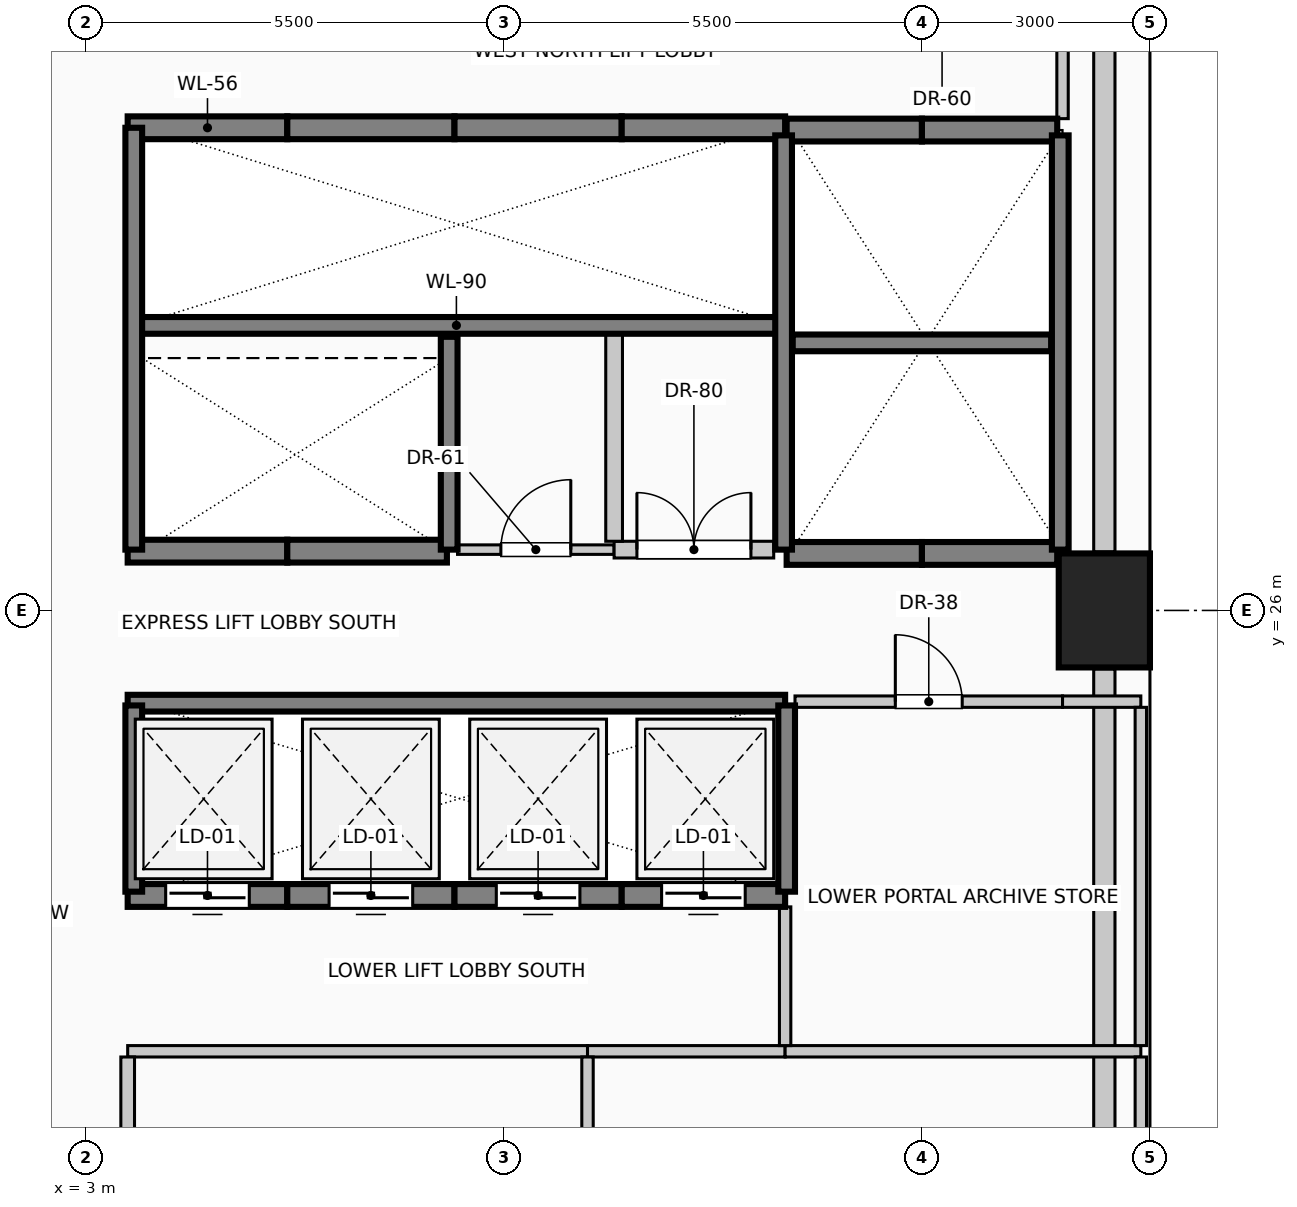
"""IFC4 building model, lengths in metres.
Left out: names, types, materials, properties, quantities, classifications, styles, units other than length and angle.
Written with IfcOpenShell. Run it as: python <this file> out.ifc"""

import sys

from ifc_helpers import new_model, si_unit, direction, frame, frame_2d, origin, origin_2d, place, context, subcontext, project, spatial, rectangle, extrude, element, fill, save


model = new_model("IFC4")
c1 = context("Model", 3, precision=1e-05, world=origin(), true_north=direction((0.0, 1.0)))
c2 = subcontext(c1, "Body", "Model", "MODEL_VIEW")
j1 = project(units=[si_unit("LENGTHUNIT", "METRE"), si_unit("PLANEANGLEUNIT", "RADIAN")], contexts=[c1])
p1 = place(None, origin())
s1 = spatial("IfcSite", under=j1, at=p1, CompositionType="ELEMENT")
p2 = place(p1, origin())
s2 = spatial("IfcBuilding", under=s1, at=p2, CompositionType="ELEMENT")
p3 = place(p2, frame((0.0, 0.0, 34.6)))
s3 = spatial("IfcBuildingStorey", under=s2, at=p3, CompositionType="ELEMENT", Elevation=34.6)
p4 = place(p3, frame((16.4, 26.0, 0.0), z_axis=(0.0, 0.0, 1.0), x_axis=(1.0, 0.0, 0.0)))
e1 = element("IfcColumn", 1, at=p4, inside=s3, PredefinedType="COLUMN", context=c2, shape_type="SweptSolid", body=[
    extrude(rectangle(XDim=1.2, YDim=1.5, at=origin_2d()), origin(), (0.0, 0.0, 1.0), 4.0),
])
p5 = place(p3, frame((16.4, 25.23, 0.0), z_axis=(0.0, 0.0, 1.0), x_axis=(0.0, -1.0, 0.0)))
e2 = element("IfcWall", 2, at=p5, inside=s3, PredefinedType="SOLIDWALL", context=c2, shape_type="SweptSolid", body=[
    extrude(rectangle(XDim=6.46, YDim=0.28, at=frame_2d((3.23, 0.0))), origin(), (0.0, 0.0, 1.0), 3.0),
])
p6 = place(p3, frame((16.4, 33.48, 0.0), z_axis=(0.0, 0.0, 1.0), x_axis=(0.0, -1.0, 0.0)))
e3 = element("IfcWall", 3, at=p6, inside=s3, PredefinedType="SOLIDWALL", context=c2, shape_type="SweptSolid", body=[
    extrude(rectangle(XDim=6.71, YDim=0.28, at=frame_2d((3.355, 0.0))), origin(), (0.0, 0.0, 1.0), 3.0),
])
p7 = place(p3, frame((5.65, 22.25, 0.0), z_axis=(0.0, 0.0, 1.0), x_axis=(-1.0, 0.0, 0.0)))
e4 = element("IfcWall", 4, at=p7, inside=s3, PredefinedType="SOLIDWALL", context=c2, shape_type="SweptSolid", body=[
    extrude(rectangle(XDim=2.1, YDim=0.3, at=frame_2d((1.05, 0.0))), origin(), (0.0, 0.0, 1.0), 4.0),
])
p8 = place(p7, frame((0.5, 0.0, 0.0)))
e5 = element("IfcOpeningElement", 5, at=p8, cuts=e4, PredefinedType="OPENING", context=c2, shape_type="SweptSolid", body=[
    extrude(rectangle(XDim=1.1, YDim=2.2, at=frame_2d((0.55, 1.1))), frame((0.0, 0.16, 0.0), z_axis=(0.0, -1.0, 0.0), x_axis=(1.0, 0.0, 0.0)), (0.0, 0.0, 1.0), 0.32),
])
p9 = place(p3, frame((7.85, 22.25, 0.0), z_axis=(0.0, 0.0, 1.0), x_axis=(-1.0, 0.0, 0.0)))
e6 = element("IfcWall", 6, at=p9, inside=s3, PredefinedType="SOLIDWALL", context=c2, shape_type="SweptSolid", body=[
    extrude(rectangle(XDim=2.2, YDim=0.3, at=frame_2d((1.1, 0.0))), origin(), (0.0, 0.0, 1.0), 4.0),
])
p10 = place(p9, frame((0.55, 0.0, 0.0)))
e7 = element("IfcOpeningElement", 7, at=p10, cuts=e6, PredefinedType="OPENING", context=c2, shape_type="SweptSolid", body=[
    extrude(rectangle(XDim=1.1, YDim=2.2, at=frame_2d((0.55, 1.1))), frame((0.0, 0.16, 0.0), z_axis=(0.0, -1.0, 0.0), x_axis=(1.0, 0.0, 0.0)), (0.0, 0.0, 1.0), 0.32),
])
p11 = place(p3, frame((10.05, 22.25, 0.0), z_axis=(0.0, 0.0, 1.0), x_axis=(-1.0, 0.0, 0.0)))
e8 = element("IfcWall", 8, at=p11, inside=s3, PredefinedType="SOLIDWALL", context=c2, shape_type="SweptSolid", body=[
    extrude(rectangle(XDim=2.2, YDim=0.3, at=frame_2d((1.1, 0.0))), origin(), (0.0, 0.0, 1.0), 4.0),
])
p12 = place(p11, frame((0.55, 0.0, 0.0)))
e9 = element("IfcOpeningElement", 9, at=p12, cuts=e8, PredefinedType="OPENING", context=c2, shape_type="SweptSolid", body=[
    extrude(rectangle(XDim=1.1, YDim=2.2, at=frame_2d((0.55, 1.1))), frame((0.0, 0.16, 0.0), z_axis=(0.0, -1.0, 0.0), x_axis=(1.0, 0.0, 0.0)), (0.0, 0.0, 1.0), 0.32),
])
p13 = place(p3, frame((12.2, 22.25, 0.0), z_axis=(0.0, 0.0, 1.0), x_axis=(-1.0, 0.0, 0.0)))
e10 = element("IfcWall", 10, at=p13, inside=s3, PredefinedType="SOLIDWALL", context=c2, shape_type="SweptSolid", body=[
    extrude(rectangle(XDim=2.15, YDim=0.3, at=frame_2d((1.075, 0.0))), origin(), (0.0, 0.0, 1.0), 4.0),
])
p14 = place(p13, frame((0.525, 0.0, 0.0)))
e11 = element("IfcOpeningElement", 11, at=p14, cuts=e10, PredefinedType="OPENING", context=c2, shape_type="SweptSolid", body=[
    extrude(rectangle(XDim=1.1, YDim=2.2, at=frame_2d((0.55, 1.1))), frame((0.0, 0.16, 0.0), z_axis=(0.0, -1.0, 0.0), x_axis=(1.0, 0.0, 0.0)), (0.0, 0.0, 1.0), 0.32),
])
for number, where, z_axis, x_axis in (
    (12, (14.0, 26.75, 0.0), (0.0, 0.0, 1.0), (-1.0, 0.0, 0.0)),
    (13, (15.78, 26.75, 0.0), (0.0, 0.0, 1.0), (-1.0, 0.0, 0.0)),
    (14, (12.22, 32.32, 0.0), (0.0, 0.0, 1.0), (1.0, 0.0, 0.0)),
    (15, (14.0, 32.32, 0.0), (0.0, 0.0, 1.0), (1.0, 0.0, 0.0)),
):
    element("IfcWall", number, at=place(p3, frame(where, z_axis=z_axis, x_axis=x_axis)), inside=s3, PredefinedType="SOLIDWALL", context=c2, shape_type="SweptSolid", body=[
        extrude(rectangle(XDim=1.78, YDim=0.3, at=frame_2d((0.89, 0.0))), origin(), (0.0, 0.0, 1.0), 4.0),
    ])
p15 = place(p3, frame((3.55, 32.35, 0.0), z_axis=(0.0, 0.0, 1.0), x_axis=(1.0, 0.0, 0.0)))
e16 = element("IfcWall", 16, at=p15, inside=s3, PredefinedType="SOLIDWALL", context=c2, shape_type="SweptSolid", body=[
    extrude(rectangle(XDim=2.1, YDim=0.3, at=frame_2d((1.05, 0.0))), origin(), (0.0, 0.0, 1.0), 4.0),
])
p16 = place(p3, frame((5.65, 32.35, 0.0), z_axis=(0.0, 0.0, 1.0), x_axis=(1.0, 0.0, 0.0)))
e17 = element("IfcWall", 17, at=p16, inside=s3, PredefinedType="SOLIDWALL", context=c2, shape_type="SweptSolid", body=[
    extrude(rectangle(XDim=2.2, YDim=0.3, at=frame_2d((1.1, 0.0))), origin(), (0.0, 0.0, 1.0), 4.0),
])
p17 = place(p3, frame((7.85, 32.35, 0.0), z_axis=(0.0, 0.0, 1.0), x_axis=(1.0, 0.0, 0.0)))
e18 = element("IfcWall", 18, at=p17, inside=s3, PredefinedType="SOLIDWALL", context=c2, shape_type="SweptSolid", body=[
    extrude(rectangle(XDim=2.2, YDim=0.3, at=frame_2d((1.1, 0.0))), origin(), (0.0, 0.0, 1.0), 4.0),
])
p18 = place(p3, frame((10.05, 32.35, 0.0), z_axis=(0.0, 0.0, 1.0), x_axis=(1.0, 0.0, 0.0)))
e19 = element("IfcWall", 19, at=p18, inside=s3, PredefinedType="SOLIDWALL", context=c2, shape_type="SweptSolid", body=[
    extrude(rectangle(XDim=2.15, YDim=0.3, at=frame_2d((1.075, 0.0))), origin(), (0.0, 0.0, 1.0), 4.0),
])
p19 = place(p3, frame((5.65, 26.78, 0.0), z_axis=(0.0, 0.0, 1.0), x_axis=(-1.0, 0.0, 0.0)))
e20 = element("IfcWall", 20, at=p19, inside=s3, PredefinedType="SOLIDWALL", context=c2, shape_type="SweptSolid", body=[
    extrude(rectangle(XDim=2.1, YDim=0.3, at=frame_2d((1.05, 0.0))), origin(), (0.0, 0.0, 1.0), 4.0),
])
p20 = place(p3, frame((7.75, 26.78, 0.0), z_axis=(0.0, 0.0, 1.0), x_axis=(-1.0, 0.0, 0.0)))
e21 = element("IfcWall", 21, at=p20, inside=s3, PredefinedType="SOLIDWALL", context=c2, shape_type="SweptSolid", body=[
    extrude(rectangle(XDim=2.1, YDim=0.3, at=frame_2d((1.05, 0.0))), origin(), (0.0, 0.0, 1.0), 4.0),
])
p21 = place(p3, frame((3.55, 29.75, 0.0), z_axis=(0.0, 0.0, 1.0), x_axis=(1.0, 0.0, 0.0)))
e22 = element("IfcWall", 22, at=p21, inside=s3, PredefinedType="SOLIDWALL", context=c2, shape_type="SweptSolid", body=[
    extrude(rectangle(XDim=8.65, YDim=0.22, at=frame_2d((4.325, 0.0))), origin(), (0.0, 0.0, 1.0), 4.0),
])
p22 = place(p3, frame((3.63, 26.8, 0.0), z_axis=(0.0, 0.0, 1.0), x_axis=(0.0, 1.0, 0.0)))
e23 = element("IfcWall", 23, at=p22, inside=s3, PredefinedType="SOLIDWALL", context=c2, shape_type="SweptSolid", body=[
    extrude(rectangle(XDim=5.55, YDim=0.22, at=frame_2d((2.775, 0.0))), origin(), (0.0, 0.0, 1.0), 4.0),
])
p23 = place(p3, frame((7.78, 26.8, 0.0), z_axis=(0.0, 0.0, 1.0), x_axis=(0.0, 1.0, 0.0)))
e24 = element("IfcWall", 24, at=p23, inside=s3, PredefinedType="SOLIDWALL", context=c2, shape_type="SweptSolid", body=[
    extrude(rectangle(XDim=2.8, YDim=0.22, at=frame_2d((1.4, 0.0))), origin(), (0.0, 0.0, 1.0), 4.0),
])
for number, where, z_axis, x_axis in (
    (25, (12.18, 26.8, 0.0), (0.0, 0.0, 1.0), (0.0, 1.0, 0.0)),
    (26, (15.82, 26.8, 0.0), (0.0, 0.0, 1.0), (0.0, 1.0, 0.0)),
):
    element("IfcWall", number, at=place(p3, frame(where, z_axis=z_axis, x_axis=x_axis)), inside=s3, PredefinedType="SOLIDWALL", context=c2, shape_type="SweptSolid", body=[
        extrude(rectangle(XDim=5.45, YDim=0.22, at=frame_2d((2.725, 0.0))), origin(), (0.0, 0.0, 1.0), 4.0),
    ])
p24 = place(p3, frame((12.3, 29.52, 0.0), z_axis=(0.0, 0.0, 1.0), x_axis=(1.0, 0.0, 0.0)))
e27 = element("IfcWall", 27, at=p24, inside=s3, PredefinedType="SOLIDWALL", context=c2, shape_type="SweptSolid", body=[
    extrude(rectangle(XDim=3.4, YDim=0.22, at=frame_2d((1.7, 0.0))), origin(), (0.0, 0.0, 1.0), 4.0),
])
p25 = place(p3, frame((3.55, 24.78, 0.0), z_axis=(0.0, 0.0, 1.0), x_axis=(1.0, 0.0, 0.0)))
e28 = element("IfcWall", 28, at=p25, inside=s3, PredefinedType="SOLIDWALL", context=c2, shape_type="SweptSolid", body=[
    extrude(rectangle(XDim=8.65, YDim=0.22, at=frame_2d((4.325, 0.0))), origin(), (0.0, 0.0, 1.0), 4.0),
])
for number, where, z_axis, x_axis in (
    (29, (3.63, 22.3, 0.0), (0.0, 0.0, 1.0), (0.0, 1.0, 0.0)),
    (30, (12.22, 22.3, 0.0), (0.0, 0.0, 1.0), (0.0, 1.0, 0.0)),
):
    element("IfcWall", number, at=place(p3, frame(where, z_axis=z_axis, x_axis=x_axis)), inside=s3, PredefinedType="SOLIDWALL", context=c2, shape_type="SweptSolid", body=[
        extrude(rectangle(XDim=2.45, YDim=0.22, at=frame_2d((1.225, 0.0))), origin(), (0.0, 0.0, 1.0), 4.0),
    ])
p26 = place(p3, frame((3.55, 20.2, 0.0), z_axis=(0.0, 0.0, 1.0), x_axis=(1.0, 0.0, 0.0)))
e31 = element("IfcWall", 31, at=p26, inside=s3, PredefinedType="PARTITIONING", context=c2, shape_type="SweptSolid", body=[
    extrude(rectangle(XDim=6.05, YDim=0.15, at=frame_2d((3.025, 0.0))), origin(), (0.0, 0.0, 1.0), 3.7),
])
p27 = place(p3, frame((9.6, 20.2, 0.0), z_axis=(0.0, 0.0, 1.0), x_axis=(1.0, 0.0, 0.0)))
e32 = element("IfcWall", 32, at=p27, inside=s3, PredefinedType="PARTITIONING", context=c2, shape_type="SweptSolid", body=[
    extrude(rectangle(XDim=2.6, YDim=0.15, at=frame_2d((1.3, 0.0))), origin(), (0.0, 0.0, 1.0), 3.7),
])
p28 = place(p3, frame((12.2, 20.2, 0.0), z_axis=(0.0, 0.0, 1.0), x_axis=(1.0, 0.0, 0.0)))
e33 = element("IfcWall", 33, at=p28, inside=s3, PredefinedType="PARTITIONING", context=c2, shape_type="SweptSolid", body=[
    extrude(rectangle(XDim=4.68, YDim=0.15, at=frame_2d((2.34, 0.0))), origin(), (0.0, 0.0, 1.0), 3.7),
])
p29 = place(p3, frame((12.33, 24.8, 0.0), z_axis=(0.0, 0.0, 1.0), x_axis=(1.0, 0.0, 0.0)))
e34 = element("IfcWall", 34, at=p29, inside=s3, PredefinedType="PARTITIONING", context=c2, shape_type="SweptSolid", body=[
    extrude(rectangle(XDim=3.52, YDim=0.15, at=frame_2d((1.76, 0.0))), origin(), (0.0, 0.0, 1.0), 3.7),
])
p30 = place(p29, frame((1.32, 0.0, 0.0)))
e35 = element("IfcOpeningElement", 35, at=p30, cuts=e34, PredefinedType="OPENING", context=c2, shape_type="SweptSolid", body=[
    extrude(rectangle(XDim=0.88, YDim=2.1, at=frame_2d((0.44, 1.05))), frame((0.0, 0.085, 0.0), z_axis=(0.0, -1.0, 0.0), x_axis=(1.0, 0.0, 0.0)), (0.0, 0.0, 1.0), 0.17),
])
p31 = place(p3, frame((15.85, 24.8, 0.0), z_axis=(0.0, 0.0, 1.0), x_axis=(1.0, 0.0, 0.0)))
e36 = element("IfcWall", 36, at=p31, inside=s3, PredefinedType="PARTITIONING", context=c2, shape_type="SweptSolid", body=[
    extrude(rectangle(XDim=1.03, YDim=0.15, at=frame_2d((0.515, 0.0))), origin(), (0.0, 0.0, 1.0), 3.7),
])
p32 = place(p3, frame((7.89, 26.8, 0.0), z_axis=(0.0, 0.0, 1.0), x_axis=(1.0, 0.0, 0.0)))
e37 = element("IfcWall", 37, at=p32, inside=s3, PredefinedType="PARTITIONING", context=c2, shape_type="SweptSolid", body=[
    extrude(rectangle(XDim=2.06, YDim=0.125, at=frame_2d((1.03, 0.0))), origin(), (0.0, 0.0, 1.0), 3.7),
])
p33 = place(p32, frame((0.57, 0.0, 0.0)))
e38 = element("IfcOpeningElement", 38, at=p33, cuts=e37, PredefinedType="OPENING", context=c2, shape_type="SweptSolid", body=[
    extrude(rectangle(XDim=0.92, YDim=2.1, at=frame_2d((0.46, 1.05))), frame((0.0, 0.073, 0.0), z_axis=(0.0, -1.0, 0.0), x_axis=(1.0, 0.0, 0.0)), (0.0, 0.0, 1.0), 0.145),
])
p34 = place(p3, frame((9.95, 26.8, 0.0), z_axis=(0.0, 0.0, 1.0), x_axis=(1.0, 0.0, 0.0)))
e39 = element("IfcWall", 39, at=p34, inside=s3, PredefinedType="PARTITIONING", context=c2, shape_type="SweptSolid", body=[
    extrude(rectangle(XDim=2.1, YDim=0.22, at=frame_2d((1.05, 0.0))), origin(), (0.0, 0.0, 1.0), 3.7),
])
p35 = place(p34, frame((0.3, 0.0, 0.0)))
e40 = element("IfcOpeningElement", 40, at=p35, cuts=e39, PredefinedType="OPENING", context=c2, shape_type="SweptSolid", body=[
    extrude(rectangle(XDim=1.5, YDim=2.25, at=frame_2d((0.75, 1.125))), frame((0.0, 0.12, 0.0), z_axis=(0.0, -1.0, 0.0), x_axis=(1.0, 0.0, 0.0)), (0.0, 0.0, 1.0), 0.24),
])
p36 = place(p3, frame((3.55, 13.69, 0.0), z_axis=(0.0, 0.0, 1.0), x_axis=(0.0, 1.0, 0.0)))
e41 = element("IfcWall", 41, at=p36, inside=s3, PredefinedType="PARTITIONING", context=c2, shape_type="SweptSolid", body=[
    extrude(rectangle(XDim=6.435, YDim=0.18, at=frame_2d((3.218, 0.0))), origin(), (0.0, 0.0, 1.0), 3.7),
])
p37 = place(p3, frame((9.6, 13.69, 0.0), z_axis=(0.0, 0.0, 1.0), x_axis=(0.0, 1.0, 0.0)))
e42 = element("IfcWall", 42, at=p37, inside=s3, PredefinedType="PARTITIONING", context=c2, shape_type="SweptSolid", body=[
    extrude(rectangle(XDim=6.435, YDim=0.15, at=frame_2d((3.218, 0.0))), origin(), (0.0, 0.0, 1.0), 3.7),
])
p38 = place(p3, frame((9.95, 26.91, 0.0), z_axis=(0.0, 0.0, 1.0), x_axis=(0.0, 1.0, 0.0)))
e43 = element("IfcWall", 43, at=p38, inside=s3, PredefinedType="PARTITIONING", context=c2, shape_type="SweptSolid", body=[
    extrude(rectangle(XDim=2.73, YDim=0.22, at=frame_2d((1.365, 0.0))), origin(), (0.0, 0.0, 1.0), 3.7),
])
p39 = place(p3, frame((12.2, 20.275, 0.0), z_axis=(0.0, 0.0, 1.0), x_axis=(0.0, 1.0, 0.0)))
e44 = element("IfcWall", 44, at=p39, inside=s3, PredefinedType="PARTITIONING", context=c2, shape_type="SweptSolid", body=[
    extrude(rectangle(XDim=1.825, YDim=0.15, at=frame_2d((0.913, 0.0))), origin(), (0.0, 0.0, 1.0), 3.7),
])
p40 = place(p3, frame((15.85, 32.47, 0.0), z_axis=(0.0, 0.0, 1.0), x_axis=(0.0, 1.0, 0.0)))
e45 = element("IfcWall", 45, at=p40, inside=s3, PredefinedType="PARTITIONING", context=c2, shape_type="SweptSolid", body=[
    extrude(rectangle(XDim=1.03, YDim=0.15, at=frame_2d((0.515, 0.0))), origin(), (0.0, 0.0, 1.0), 3.7),
])
p41 = place(p3, frame((16.88, 18.75, 0.0), z_axis=(0.0, 0.0, 1.0), x_axis=(0.0, 1.0, 0.0)))
e46 = element("IfcWall", 46, at=p41, inside=s3, PredefinedType="PARTITIONING", context=c2, shape_type="SweptSolid", body=[
    extrude(rectangle(XDim=1.375, YDim=0.15, at=frame_2d((0.688, 0.0))), origin(), (0.0, 0.0, 1.0), 3.7),
])
p42 = place(p3, frame((16.88, 20.275, 0.0), z_axis=(0.0, 0.0, 1.0), x_axis=(0.0, 1.0, 0.0)))
e47 = element("IfcWall", 47, at=p42, inside=s3, PredefinedType="PARTITIONING", context=c2, shape_type="SweptSolid", body=[
    extrude(rectangle(XDim=4.45, YDim=0.15, at=frame_2d((2.225, 0.0))), origin(), (0.0, 0.0, 1.0), 3.7),
])
p43 = place(p8, origin())
e48 = element("IfcDoor", 48, at=p43, inside=s3, OperationType="SLIDING_TO_LEFT", PredefinedType="DOOR", context=c2, shape_type="SweptSolid", body=[
    extrude(rectangle(XDim=1.1, YDim=2.2, at=frame_2d((0.55, 1.1))), frame((0.0, 0.025, 0.0), z_axis=(0.0, -1.0, 0.0), x_axis=(1.0, 0.0, 0.0)), (0.0, 0.0, 1.0), 0.05),
])
fill(e5, e48)
p44 = place(p10, origin())
e49 = element("IfcDoor", 49, at=p44, inside=s3, OperationType="SLIDING_TO_RIGHT", PredefinedType="DOOR", context=c2, shape_type="SweptSolid", body=[
    extrude(rectangle(XDim=1.1, YDim=2.2, at=frame_2d((0.55, 1.1))), frame((0.0, 0.025, 0.0), z_axis=(0.0, -1.0, 0.0), x_axis=(1.0, 0.0, 0.0)), (0.0, 0.0, 1.0), 0.05),
])
fill(e7, e49)
p45 = place(p12, origin())
e50 = element("IfcDoor", 50, at=p45, inside=s3, OperationType="SLIDING_TO_LEFT", PredefinedType="DOOR", context=c2, shape_type="SweptSolid", body=[
    extrude(rectangle(XDim=1.1, YDim=2.2, at=frame_2d((0.55, 1.1))), frame((0.0, 0.025, 0.0), z_axis=(0.0, -1.0, 0.0), x_axis=(1.0, 0.0, 0.0)), (0.0, 0.0, 1.0), 0.05),
])
fill(e9, e50)
p46 = place(p14, origin())
e51 = element("IfcDoor", 51, at=p46, inside=s3, OperationType="SLIDING_TO_RIGHT", PredefinedType="DOOR", context=c2, shape_type="SweptSolid", body=[
    extrude(rectangle(XDim=1.1, YDim=2.2, at=frame_2d((0.55, 1.1))), frame((0.0, 0.025, 0.0), z_axis=(0.0, -1.0, 0.0), x_axis=(1.0, 0.0, 0.0)), (0.0, 0.0, 1.0), 0.05),
])
fill(e11, e51)
p47 = place(p30, origin())
e52 = element("IfcDoor", 52, at=p47, inside=s3, OperationType="SINGLE_SWING_LEFT", PredefinedType="DOOR", context=c2, shape_type="SweptSolid", body=[
    extrude(rectangle(XDim=0.88, YDim=2.1, at=frame_2d((0.44, 1.05))), frame((0.0, 0.025, 0.0), z_axis=(0.0, -1.0, 0.0), x_axis=(1.0, 0.0, 0.0)), (0.0, 0.0, 1.0), 0.05),
])
fill(e35, e52)
p48 = place(p33, origin())
e53 = element("IfcDoor", 53, at=p48, inside=s3, OperationType="SINGLE_SWING_RIGHT", PredefinedType="DOOR", context=c2, shape_type="SweptSolid", body=[
    extrude(rectangle(XDim=0.92, YDim=2.1, at=frame_2d((0.46, 1.05))), frame((0.0, 0.025, 0.0), z_axis=(0.0, -1.0, 0.0), x_axis=(1.0, 0.0, 0.0)), (0.0, 0.0, 1.0), 0.05),
])
fill(e38, e53)
p49 = place(p35, origin())
e54 = element("IfcDoor", 54, at=p49, inside=s3, OperationType="DOUBLE_DOOR_SINGLE_SWING", PredefinedType="DOOR", context=c2, shape_type="SweptSolid", body=[
    extrude(rectangle(XDim=1.5, YDim=2.25, at=frame_2d((0.75, 1.125))), frame((0.0, 0.025, 0.0), z_axis=(0.0, -1.0, 0.0), x_axis=(1.0, 0.0, 0.0)), (0.0, 0.0, 1.0), 0.05),
])
fill(e40, e54)
save(model, sys.argv[1])
